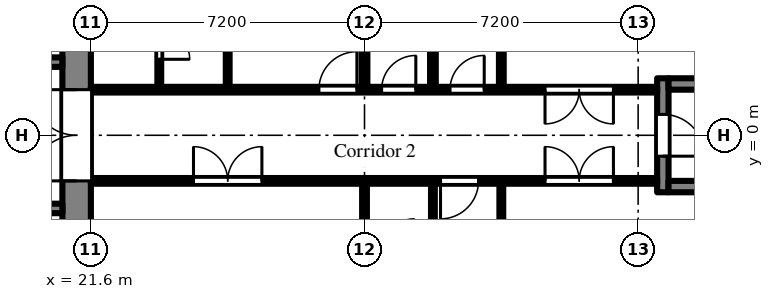
"""IFC4 building model, lengths in metres.
Left out: names, types, materials, properties, quantities, classifications, styles, units other than length and angle.
Written with IfcOpenShell. Run it as: python <this file> out.ifc"""

import sys

from ifc_helpers import new_model, si_unit, direction, frame, frame_2d, origin, place, context, subcontext, project, spatial, rectangle, extrude, element, fill, save


model = new_model("IFC4")
c1 = context("Model", 3, precision=1e-05, world=origin(), true_north=direction((0.0, 1.0)))
c2 = subcontext(c1, "Body", "Model", "MODEL_VIEW")
j1 = project(units=[si_unit("LENGTHUNIT", "METRE"), si_unit("PLANEANGLEUNIT", "RADIAN")], contexts=[c1])
p1 = place(None, origin())
s1 = spatial("IfcSite", under=j1, at=p1, CompositionType="ELEMENT")
p2 = place(p1, origin())
s2 = spatial("IfcBuilding", under=s1, at=p2, CompositionType="ELEMENT")
p3 = place(p2, frame((0.0, 0.0, 93.9)))
s3 = spatial("IfcBuildingStorey", under=s2, at=p3, CompositionType="ELEMENT", Elevation=93.9)
p4 = place(p3, frame((21.225, -7.2, 0.0), z_axis=(0.0, 0.0, 1.0), x_axis=(0.0, 1.0, 0.0)))
e1 = element("IfcWall", 1, at=p4, inside=s3, PredefinedType="SHEAR", context=c2, shape_type="SweptSolid", body=[
    extrude(rectangle(XDim=14.4, YDim=0.75, at=frame_2d((7.2, 0.0))), origin(), (0.0, 0.0, 1.0), 2.575),
])
p5 = place(p4, frame((6.0, 0.0, 0.0)))
e2 = element("IfcOpeningElement", 2, at=p5, cuts=e1, PredefinedType="OPENING", context=c2, shape_type="SweptSolid", body=[
    extrude(rectangle(XDim=2.4, YDim=2.2, at=frame_2d((1.2, 1.1))), frame((0.0, 0.385, 0.0), z_axis=(0.0, -1.0, 0.0), x_axis=(1.0, 0.0, 0.0)), (0.0, 0.0, 1.0), 0.77),
])
p6 = place(p3, frame((7.9, 1.925, 0.0), z_axis=(0.0, 0.0, 1.0), x_axis=(1.0, 0.0, 0.0)))
e3 = element("IfcWall", 3, at=p6, inside=s3, PredefinedType="SHEAR", context=c2, shape_type="SweptSolid", body=[
    extrude(rectangle(XDim=12.95, YDim=0.25, at=frame_2d((6.475, 0.0))), origin(), (0.0, 0.0, 1.0), 2.575),
])
p7 = place(p6, frame((0.525, 0.0, 0.0)))
e4 = element("IfcOpeningElement", 4, at=p7, cuts=e3, PredefinedType="OPENING", context=c2, shape_type="SweptSolid", body=[
    extrude(rectangle(XDim=0.9, YDim=2.1, at=frame_2d((0.45, 1.05))), frame((0.0, 0.135, 0.0), z_axis=(0.0, -1.0, 0.0), x_axis=(1.0, 0.0, 0.0)), (0.0, 0.0, 1.0), 0.27),
])
p8 = place(p6, frame((2.625, 0.0, 0.0)))
e5 = element("IfcOpeningElement", 5, at=p8, cuts=e3, PredefinedType="OPENING", context=c2, shape_type="SweptSolid", body=[
    extrude(rectangle(XDim=1.1, YDim=2.1, at=frame_2d((0.55, 1.05))), frame((0.0, 0.135, 0.0), z_axis=(0.0, -1.0, 0.0), x_axis=(1.0, 0.0, 0.0)), (0.0, 0.0, 1.0), 0.27),
])
p9 = place(p6, frame((7.125, 0.0, 0.0)))
e6 = element("IfcOpeningElement", 6, at=p9, cuts=e3, PredefinedType="OPENING", context=c2, shape_type="SweptSolid", body=[
    extrude(rectangle(XDim=0.9, YDim=2.1, at=frame_2d((0.45, 1.05))), frame((0.0, 0.135, 0.0), z_axis=(0.0, -1.0, 0.0), x_axis=(1.0, 0.0, 0.0)), (0.0, 0.0, 1.0), 0.27),
])
p10 = place(p3, frame((7.9, -1.925, 0.0), z_axis=(0.0, 0.0, 1.0), x_axis=(1.0, 0.0, 0.0)))
e7 = element("IfcWall", 7, at=p10, inside=s3, PredefinedType="SHEAR", context=c2, shape_type="SweptSolid", body=[
    extrude(rectangle(XDim=12.95, YDim=0.25, at=frame_2d((6.475, 0.0))), origin(), (0.0, 0.0, 1.0), 2.575),
])
p11 = place(p10, frame((4.825, 0.0, 0.0)))
e8 = element("IfcOpeningElement", 8, at=p11, cuts=e7, PredefinedType="OPENING", context=c2, shape_type="SweptSolid", body=[
    extrude(rectangle(XDim=1.1, YDim=2.1, at=frame_2d((0.55, 1.05))), frame((0.0, 0.135, 0.0), z_axis=(0.0, -1.0, 0.0), x_axis=(1.0, 0.0, 0.0)), (0.0, 0.0, 1.0), 0.27),
])
p12 = place(p10, frame((7.025, 0.0, 0.0)))
e9 = element("IfcOpeningElement", 9, at=p12, cuts=e7, PredefinedType="OPENING", context=c2, shape_type="SweptSolid", body=[
    extrude(rectangle(XDim=1.1, YDim=2.1, at=frame_2d((0.55, 1.05))), frame((0.0, 0.135, 0.0), z_axis=(0.0, -1.0, 0.0), x_axis=(1.0, 0.0, 0.0)), (0.0, 0.0, 1.0), 0.27),
])
p13 = place(p10, frame((9.225, 0.0, 0.0)))
e10 = element("IfcOpeningElement", 10, at=p13, cuts=e7, PredefinedType="OPENING", context=c2, shape_type="SweptSolid", body=[
    extrude(rectangle(XDim=1.1, YDim=2.1, at=frame_2d((0.55, 1.05))), frame((0.0, 0.135, 0.0), z_axis=(0.0, -1.0, 0.0), x_axis=(1.0, 0.0, 0.0)), (0.0, 0.0, 1.0), 0.27),
])
p14 = place(p10, frame((0.525, 0.0, 0.0)))
e11 = element("IfcOpeningElement", 11, at=p14, cuts=e7, PredefinedType="OPENING", context=c2, shape_type="SweptSolid", body=[
    extrude(rectangle(XDim=0.9, YDim=2.1, at=frame_2d((0.45, 1.05))), frame((0.0, 0.135, 0.0), z_axis=(0.0, -1.0, 0.0), x_axis=(1.0, 0.0, 0.0)), (0.0, 0.0, 1.0), 0.27),
])
p15 = place(p10, frame((2.625, 0.0, 0.0)))
e12 = element("IfcOpeningElement", 12, at=p15, cuts=e7, PredefinedType="OPENING", context=c2, shape_type="SweptSolid", body=[
    extrude(rectangle(XDim=1.1, YDim=2.1, at=frame_2d((0.55, 1.05))), frame((0.0, 0.135, 0.0), z_axis=(0.0, -1.0, 0.0), x_axis=(1.0, 0.0, 0.0)), (0.0, 0.0, 1.0), 0.27),
])
p16 = place(p3, frame((36.65, -1.5, 0.0), z_axis=(0.0, 0.0, 1.0), x_axis=(0.0, 1.0, 0.0)))
e13 = element("IfcWall", 13, at=p16, inside=s3, PredefinedType="SHEAR", context=c2, shape_type="SweptSolid", body=[
    extrude(rectangle(XDim=3.0, YDim=0.3, at=frame_2d((1.5, 0.0))), origin(), (0.0, 0.0, 1.0), 2.575),
])
p17 = place(p16, frame((0.95, 0.0, 0.0)))
e14 = element("IfcOpeningElement", 14, at=p17, cuts=e13, PredefinedType="OPENING", context=c2, shape_type="SweptSolid", body=[
    extrude(rectangle(XDim=1.1, YDim=2.1, at=frame_2d((0.55, 1.05))), frame((0.0, 0.16, 0.0), z_axis=(0.0, -1.0, 0.0), x_axis=(1.0, 0.0, 0.0)), (0.0, 0.0, 1.0), 0.32),
])
for number, where, z_axis, x_axis in (
    (15, (36.8, -1.35, 0.0), (0.0, 0.0, 1.0), (1.0, 0.0, 0.0)),
    (16, (36.8, 1.35, 0.0), (0.0, 0.0, 1.0), (1.0, 0.0, 0.0)),
):
    element("IfcWall", number, at=place(p3, frame(where, z_axis=z_axis, x_axis=x_axis)), inside=s3, PredefinedType="SHEAR", context=c2, shape_type="SweptSolid", body=[
        extrude(rectangle(XDim=5.8, YDim=0.3, at=frame_2d((2.9, 0.0))), origin(), (0.0, 0.0, 1.0), 2.575),
    ])
p18 = place(p3, frame((21.6, -1.2, 0.0), z_axis=(0.0, 0.0, 1.0), x_axis=(1.0, 0.0, 0.0)))
e17 = element("IfcWall", 17, at=p18, inside=s3, PredefinedType="PARTITIONING", context=c2, shape_type="SweptSolid", body=[
    extrude(rectangle(XDim=14.9, YDim=0.15, at=frame_2d((7.45, 0.0))), origin(), (0.0, 0.0, 1.0), 2.575),
])
p19 = place(p18, frame((2.7, 0.0, 0.0)))
e18 = element("IfcOpeningElement", 18, at=p19, cuts=e17, PredefinedType="OPENING", context=c2, shape_type="SweptSolid", body=[
    extrude(rectangle(XDim=1.8, YDim=2.1, at=frame_2d((0.9, 1.05))), frame((0.0, 0.085, 0.0), z_axis=(0.0, -1.0, 0.0), x_axis=(1.0, 0.0, 0.0)), (0.0, 0.0, 1.0), 0.17),
])
p20 = place(p18, frame((9.2, 0.0, 0.0)))
e19 = element("IfcOpeningElement", 19, at=p20, cuts=e17, PredefinedType="OPENING", context=c2, shape_type="SweptSolid", body=[
    extrude(rectangle(XDim=1.0, YDim=2.1, at=frame_2d((0.5, 1.05))), frame((0.0, 0.085, 0.0), z_axis=(0.0, -1.0, 0.0), x_axis=(1.0, 0.0, 0.0)), (0.0, 0.0, 1.0), 0.17),
])
p21 = place(p18, frame((11.95, 0.0, 0.0)))
e20 = element("IfcOpeningElement", 20, at=p21, cuts=e17, PredefinedType="OPENING", context=c2, shape_type="SweptSolid", body=[
    extrude(rectangle(XDim=1.8, YDim=2.1, at=frame_2d((0.9, 1.05))), frame((0.0, 0.085, 0.0), z_axis=(0.0, -1.0, 0.0), x_axis=(1.0, 0.0, 0.0)), (0.0, 0.0, 1.0), 0.17),
])
p22 = place(p3, frame((21.6, 1.2, 0.0), z_axis=(0.0, 0.0, 1.0), x_axis=(1.0, 0.0, 0.0)))
e21 = element("IfcWall", 21, at=p22, inside=s3, PredefinedType="PARTITIONING", context=c2, shape_type="SweptSolid", body=[
    extrude(rectangle(XDim=14.9, YDim=0.15, at=frame_2d((7.45, 0.0))), origin(), (0.0, 0.0, 1.0), 2.575),
])
p23 = place(p22, frame((6.0, 0.0, 0.0)))
e22 = element("IfcOpeningElement", 22, at=p23, cuts=e21, PredefinedType="OPENING", context=c2, shape_type="SweptSolid", body=[
    extrude(rectangle(XDim=1.0, YDim=2.1, at=frame_2d((0.5, 1.05))), frame((0.0, 0.085, 0.0), z_axis=(0.0, -1.0, 0.0), x_axis=(1.0, 0.0, 0.0)), (0.0, 0.0, 1.0), 0.17),
])
p24 = place(p22, frame((7.65, 0.0, 0.0)))
e23 = element("IfcOpeningElement", 23, at=p24, cuts=e21, PredefinedType="OPENING", context=c2, shape_type="SweptSolid", body=[
    extrude(rectangle(XDim=0.9, YDim=2.1, at=frame_2d((0.45, 1.05))), frame((0.0, 0.085, 0.0), z_axis=(0.0, -1.0, 0.0), x_axis=(1.0, 0.0, 0.0)), (0.0, 0.0, 1.0), 0.17),
])
p25 = place(p22, frame((9.45, 0.0, 0.0)))
e24 = element("IfcOpeningElement", 24, at=p25, cuts=e21, PredefinedType="OPENING", context=c2, shape_type="SweptSolid", body=[
    extrude(rectangle(XDim=0.9, YDim=2.1, at=frame_2d((0.45, 1.05))), frame((0.0, 0.085, 0.0), z_axis=(0.0, -1.0, 0.0), x_axis=(1.0, 0.0, 0.0)), (0.0, 0.0, 1.0), 0.17),
])
p26 = place(p22, frame((11.95, 0.0, 0.0)))
e25 = element("IfcOpeningElement", 25, at=p26, cuts=e21, PredefinedType="OPENING", context=c2, shape_type="SweptSolid", body=[
    extrude(rectangle(XDim=1.8, YDim=2.1, at=frame_2d((0.9, 1.05))), frame((0.0, 0.085, 0.0), z_axis=(0.0, -1.0, 0.0), x_axis=(1.0, 0.0, 0.0)), (0.0, 0.0, 1.0), 0.17),
])
p27 = place(p3, frame((23.4, 1.275, 0.0), z_axis=(0.0, 0.0, 1.0), x_axis=(0.0, 1.0, 0.0)))
e26 = element("IfcWall", 26, at=p27, inside=s3, PredefinedType="PARTITIONING", context=c2, shape_type="SweptSolid", body=[
    extrude(rectangle(XDim=2.375, YDim=0.1, at=frame_2d((1.188, 0.0))), origin(), (0.0, 0.0, 1.0), 2.575),
])
p28 = place(p27, frame((0.725, 0.0, 0.0)))
e27 = element("IfcOpeningElement", 27, at=p28, cuts=e26, PredefinedType="OPENING", context=c2, shape_type="SweptSolid", body=[
    extrude(rectangle(XDim=0.8, YDim=2.1, at=frame_2d((0.4, 1.05))), frame((0.0, 0.06, 0.0), z_axis=(0.0, -1.0, 0.0), x_axis=(1.0, 0.0, 0.0)), (0.0, 0.0, 1.0), 0.12),
])
p29 = place(p3, frame((25.2, 1.275, 0.0), z_axis=(0.0, 0.0, 1.0), x_axis=(0.0, 1.0, 0.0)))
e28 = element("IfcWall", 28, at=p29, inside=s3, PredefinedType="PARTITIONING", context=c2, shape_type="SweptSolid", body=[
    extrude(rectangle(XDim=2.275, YDim=0.1, at=frame_2d((1.138, 0.0))), origin(), (0.0, 0.0, 1.0), 2.575),
])
p30 = place(p3, frame((28.8, -3.0, 0.0), z_axis=(0.0, 0.0, 1.0), x_axis=(0.0, 1.0, 0.0)))
e29 = element("IfcWall", 29, at=p30, inside=s3, PredefinedType="PARTITIONING", context=c2, shape_type="SweptSolid", body=[
    extrude(rectangle(XDim=1.725, YDim=0.125, at=frame_2d((0.863, 0.0))), origin(), (0.0, 0.0, 1.0), 2.575),
])
p31 = place(p3, frame((28.8, 1.275, 0.0), z_axis=(0.0, 0.0, 1.0), x_axis=(0.0, 1.0, 0.0)))
e30 = element("IfcWall", 30, at=p31, inside=s3, PredefinedType="PARTITIONING", context=c2, shape_type="SweptSolid", body=[
    extrude(rectangle(XDim=5.625, YDim=0.15, at=frame_2d((2.812, 0.0))), origin(), (0.0, 0.0, 1.0), 2.575),
])
p32 = place(p3, frame((30.6, -2.95, 0.0), z_axis=(0.0, 0.0, 1.0), x_axis=(0.0, 1.0, 0.0)))
e31 = element("IfcWall", 31, at=p32, inside=s3, PredefinedType="PARTITIONING", context=c2, shape_type="SweptSolid", body=[
    extrude(rectangle(XDim=1.675, YDim=0.1, at=frame_2d((0.837, 0.0))), origin(), (0.0, 0.0, 1.0), 2.575),
])
p33 = place(p3, frame((30.6, 1.275, 0.0), z_axis=(0.0, 0.0, 1.0), x_axis=(0.0, 1.0, 0.0)))
e32 = element("IfcWall", 32, at=p33, inside=s3, PredefinedType="PARTITIONING", context=c2, shape_type="SweptSolid", body=[
    extrude(rectangle(XDim=5.625, YDim=0.15, at=frame_2d((2.812, 0.0))), origin(), (0.0, 0.0, 1.0), 2.575),
])
p34 = place(p3, frame((32.4, -6.9, 0.0), z_axis=(0.0, 0.0, 1.0), x_axis=(0.0, 1.0, 0.0)))
e33 = element("IfcWall", 33, at=p34, inside=s3, PredefinedType="PARTITIONING", context=c2, shape_type="SweptSolid", body=[
    extrude(rectangle(XDim=5.625, YDim=0.1, at=frame_2d((2.812, 0.0))), origin(), (0.0, 0.0, 1.0), 2.575),
])
p35 = place(p3, frame((32.4, 1.275, 0.0), z_axis=(0.0, 0.0, 1.0), x_axis=(0.0, 1.0, 0.0)))
e34 = element("IfcWall", 34, at=p35, inside=s3, PredefinedType="PARTITIONING", context=c2, shape_type="SweptSolid", body=[
    extrude(rectangle(XDim=5.625, YDim=0.125, at=frame_2d((2.812, 0.0))), origin(), (0.0, 0.0, 1.0), 2.575),
])
p36 = place(p5, origin())
e35 = element("IfcDoor", 35, at=p36, inside=s3, OperationType="DOUBLE_DOOR_DOUBLE_SWING", PredefinedType="DOOR", context=c2, shape_type="SweptSolid", body=[
    extrude(rectangle(XDim=2.4, YDim=2.2, at=frame_2d((1.2, 1.1))), frame((0.0, 0.025, 0.0), z_axis=(0.0, -1.0, 0.0), x_axis=(1.0, 0.0, 0.0)), (0.0, 0.0, 1.0), 0.05),
])
fill(e2, e35)
p37 = place(p17, frame((1.1, 0.0, 0.0), z_axis=(0.0, 0.0, 1.0), x_axis=(-1.0, 0.0, 0.0)))
e36 = element("IfcDoor", 36, at=p37, inside=s3, OperationType="SINGLE_SWING_RIGHT", PredefinedType="DOOR", context=c2, shape_type="SweptSolid", body=[
    extrude(rectangle(XDim=1.1, YDim=2.1, at=frame_2d((0.55, 1.05))), frame((0.0, 0.025, 0.0), z_axis=(0.0, -1.0, 0.0), x_axis=(1.0, 0.0, 0.0)), (0.0, 0.0, 1.0), 0.05),
])
fill(e14, e36)
p38 = place(p28, frame((0.8, 0.0, 0.0), z_axis=(0.0, 0.0, 1.0), x_axis=(-1.0, 0.0, 0.0)))
e37 = element("IfcDoor", 37, at=p38, inside=s3, OperationType="SINGLE_SWING_RIGHT", PredefinedType="DOOR", context=c2, shape_type="SweptSolid", body=[
    extrude(rectangle(XDim=0.8, YDim=2.1, at=frame_2d((0.4, 1.05))), frame((0.0, 0.025, 0.0), z_axis=(0.0, -1.0, 0.0), x_axis=(1.0, 0.0, 0.0)), (0.0, 0.0, 1.0), 0.05),
])
fill(e27, e37)
p39 = place(p23, origin())
e38 = element("IfcDoor", 38, at=p39, inside=s3, OperationType="SINGLE_SWING_RIGHT", PredefinedType="DOOR", context=c2, shape_type="SweptSolid", body=[
    extrude(rectangle(XDim=1.0, YDim=2.1, at=frame_2d((0.5, 1.05))), frame((0.0, 0.025, 0.0), z_axis=(0.0, -1.0, 0.0), x_axis=(1.0, 0.0, 0.0)), (0.0, 0.0, 1.0), 0.05),
])
fill(e22, e38)
p40 = place(p24, origin())
e39 = element("IfcDoor", 39, at=p40, inside=s3, OperationType="SINGLE_SWING_RIGHT", PredefinedType="DOOR", context=c2, shape_type="SweptSolid", body=[
    extrude(rectangle(XDim=0.9, YDim=2.1, at=frame_2d((0.45, 1.05))), frame((0.0, 0.025, 0.0), z_axis=(0.0, -1.0, 0.0), x_axis=(1.0, 0.0, 0.0)), (0.0, 0.0, 1.0), 0.05),
])
fill(e23, e39)
p41 = place(p25, origin())
e40 = element("IfcDoor", 40, at=p41, inside=s3, OperationType="SINGLE_SWING_RIGHT", PredefinedType="DOOR", context=c2, shape_type="SweptSolid", body=[
    extrude(rectangle(XDim=0.9, YDim=2.1, at=frame_2d((0.45, 1.05))), frame((0.0, 0.025, 0.0), z_axis=(0.0, -1.0, 0.0), x_axis=(1.0, 0.0, 0.0)), (0.0, 0.0, 1.0), 0.05),
])
fill(e24, e40)
p42 = place(p26, frame((1.8, 0.0, 0.0), z_axis=(0.0, 0.0, 1.0), x_axis=(-1.0, 0.0, 0.0)))
e41 = element("IfcDoor", 41, at=p42, inside=s3, OperationType="DOUBLE_DOOR_DOUBLE_SWING", PredefinedType="DOOR", context=c2, shape_type="SweptSolid", body=[
    extrude(rectangle(XDim=1.8, YDim=2.1, at=frame_2d((0.9, 1.05))), frame((0.0, 0.025, 0.0), z_axis=(0.0, -1.0, 0.0), x_axis=(1.0, 0.0, 0.0)), (0.0, 0.0, 1.0), 0.05),
])
fill(e25, e41)
p43 = place(p19, origin())
e42 = element("IfcDoor", 42, at=p43, inside=s3, OperationType="DOUBLE_DOOR_DOUBLE_SWING", PredefinedType="DOOR", context=c2, shape_type="SweptSolid", body=[
    extrude(rectangle(XDim=1.8, YDim=2.1, at=frame_2d((0.9, 1.05))), frame((0.0, 0.025, 0.0), z_axis=(0.0, -1.0, 0.0), x_axis=(1.0, 0.0, 0.0)), (0.0, 0.0, 1.0), 0.05),
])
fill(e18, e42)
p44 = place(p20, frame((1.0, 0.0, 0.0), z_axis=(0.0, 0.0, 1.0), x_axis=(-1.0, 0.0, 0.0)))
e43 = element("IfcDoor", 43, at=p44, inside=s3, OperationType="SINGLE_SWING_RIGHT", PredefinedType="DOOR", context=c2, shape_type="SweptSolid", body=[
    extrude(rectangle(XDim=1.0, YDim=2.1, at=frame_2d((0.5, 1.05))), frame((0.0, 0.025, 0.0), z_axis=(0.0, -1.0, 0.0), x_axis=(1.0, 0.0, 0.0)), (0.0, 0.0, 1.0), 0.05),
])
fill(e19, e43)
p45 = place(p21, origin())
e44 = element("IfcDoor", 44, at=p45, inside=s3, OperationType="DOUBLE_DOOR_DOUBLE_SWING", PredefinedType="DOOR", context=c2, shape_type="SweptSolid", body=[
    extrude(rectangle(XDim=1.8, YDim=2.1, at=frame_2d((0.9, 1.05))), frame((0.0, 0.025, 0.0), z_axis=(0.0, -1.0, 0.0), x_axis=(1.0, 0.0, 0.0)), (0.0, 0.0, 1.0), 0.05),
])
fill(e20, e44)
save(model, sys.argv[1])
